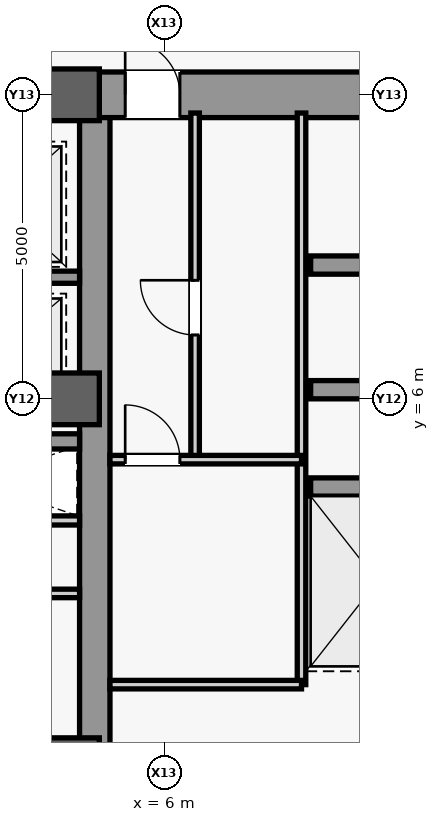
"""IFC4 building model, lengths in metres.
Left out: names, types, materials, properties, quantities, classifications, styles, units other than length and angle.
Written with IfcOpenShell. Run it as: python <this file> out.ifc"""

import sys

from ifc_helpers import new_model, si_unit, direction, frame, frame_2d, origin, origin_2d, place, context, subcontext, project, spatial, rectangle, extrude, source, transform, mapped, element, fill, save


model = new_model("IFC4")
c1 = context("Model", 3, precision=1e-05, world=origin(), true_north=direction((0.0, 1.0)))
c2 = subcontext(c1, "Body", "Model", "MODEL_VIEW")
j1 = project(units=[si_unit("LENGTHUNIT", "METRE"), si_unit("PLANEANGLEUNIT", "RADIAN")], contexts=[c1])
p1 = place(None, origin())
s1 = spatial("IfcSite", under=j1, at=p1, CompositionType="ELEMENT")
p2 = place(p1, origin())
s2 = spatial("IfcBuilding", under=s1, at=p2, CompositionType="ELEMENT")
p3 = place(p2, frame((0.0, 0.0, 159.1)))
s3 = spatial("IfcBuildingStorey", under=s2, at=p3, CompositionType="ELEMENT", Elevation=159.1)
m1 = source(origin(), c2, "Body", "SweptSolid", [
    extrude(rectangle(XDim=21.4, YDim=0.5, at=frame_2d((10.7, 0.0))), origin(), (0.0, 0.0, 1.0), 3.78),
])
p4 = place(p3, frame((4.85, -10.7, 0.0), z_axis=(0.0, 0.0, 1.0), x_axis=(0.0, 1.0, 0.0)))
e1 = element("IfcWall", 1, at=p4, inside=s3, PredefinedType="SHEAR", context=c2, shape_type="MappedRepresentation", body=[
    mapped(m1, transform((0.0, 0.0, 0.0), scale=1.0)),
])
m2 = source(origin(), c2, "Body", "SweptSolid", [
    extrude(rectangle(XDim=5.85, YDim=0.75, at=frame_2d((2.925, 0.0))), origin(), (0.0, 0.0, 1.0), 3.78),
])
p5 = place(p3, frame((4.85, 11.0, 0.0), z_axis=(0.0, 0.0, 1.0), x_axis=(1.0, 0.0, 0.0)))
e2 = element("IfcWall", 2, at=p5, inside=s3, PredefinedType="SHEAR", context=c2, shape_type="MappedRepresentation", body=[
    mapped(m2, transform((0.0, 0.0, 0.0), scale=1.0)),
])
m3 = source(origin(), c2, "Body", "SweptSolid", [
    extrude(rectangle(XDim=0.9, YDim=2.15, at=frame_2d((0.45, 1.075))), frame((0.0, 0.385, 0.0), z_axis=(0.0, -1.0, 0.0), x_axis=(1.0, 0.0, 0.0)), (0.0, 0.0, 1.0), 0.77),
])
p6 = place(p5, frame((0.5, 0.0, 0.0)))
e3 = element("IfcOpeningElement", 3, at=p6, cuts=e2, PredefinedType="OPENING", context=c2, shape_type="MappedRepresentation", body=[
    mapped(m3, transform((0.0, 0.0, 0.0), scale=1.0)),
])
m4 = source(origin(), c2, "Body", "SweptSolid", [
    extrude(rectangle(XDim=9.2, YDim=0.5, at=frame_2d((4.6, 0.0))), origin(), (0.0, 0.0, 1.0), 3.78),
])
p7 = place(p3, frame((-4.6, 11.0, 0.0), z_axis=(0.0, 0.0, 1.0), x_axis=(1.0, 0.0, 0.0)))
e4 = element("IfcWall", 4, at=p7, inside=s3, PredefinedType="SHEAR", context=c2, shape_type="MappedRepresentation", body=[
    mapped(m4, transform((0.0, 0.0, 0.0), scale=1.0)),
])
m5 = source(origin(), c2, "Body", "SweptSolid", [
    extrude(rectangle(XDim=1.8, YDim=2.25, at=frame_2d((0.9, 1.125))), frame((0.0, 0.26, 0.0), z_axis=(0.0, -1.0, 0.0), x_axis=(1.0, 0.0, 0.0)), (0.0, 0.0, 1.0), 0.52),
])
p8 = place(p7, frame((3.7, 0.0, 0.0)))
e5 = element("IfcOpeningElement", 5, at=p8, cuts=e4, PredefinedType="OPENING", context=c2, shape_type="MappedRepresentation", body=[
    mapped(m5, transform((0.0, 0.0, 0.0), scale=1.0)),
])
m6 = source(origin(), c2, "Body", "SweptSolid", [
    extrude(rectangle(XDim=0.85, YDim=0.85, at=origin_2d()), origin(), (0.0, 0.0, 1.0), 4.0),
])
for number, where, z_axis, x_axis in (
    (6, (4.5, 0.0, 0.0), (0.0, 0.0, 1.0), (1.0, 0.0, 0.0)),
    (7, (4.5, 6.0, 0.0), (0.0, 0.0, 1.0), (1.0, 0.0, 0.0)),
    (8, (4.5, 11.0, 0.0), (0.0, 0.0, 1.0), (1.0, 0.0, 0.0)),
):
    element("IfcColumn", number, at=place(p3, frame(where, z_axis=z_axis, x_axis=x_axis)), inside=s3, PredefinedType="COLUMN", context=c2, shape_type="MappedRepresentation", body=[
        mapped(m6, transform((0.0, 0.0, 0.0), scale=1.0)),
    ])
m7 = source(origin(), c2, "Body", "SweptSolid", [
    extrude(rectangle(XDim=2.3, YDim=0.3, at=frame_2d((1.15, 0.0))), origin(), (0.0, 0.0, 1.0), 3.78),
])
for number, where, z_axis, x_axis in (
    (9, (8.4, 4.55, 0.0), (0.0, 0.0, 1.0), (1.0, 0.0, 0.0)),
    (10, (8.4, 6.15, 0.0), (0.0, 0.0, 1.0), (1.0, 0.0, 0.0)),
    (11, (8.4, 8.2, 0.0), (0.0, 0.0, 1.0), (1.0, 0.0, 0.0)),
):
    element("IfcWall", number, at=place(p3, frame(where, z_axis=z_axis, x_axis=x_axis)), inside=s3, PredefinedType="SHEAR", context=c2, shape_type="MappedRepresentation", body=[
        mapped(m7, transform((0.0, 0.0, 0.0), scale=1.0)),
    ])
m8 = source(origin(), c2, "Body", "SweptSolid", [
    extrude(rectangle(XDim=9.4, YDim=0.14, at=frame_2d((4.7, 0.0))), origin(), (0.0, 0.0, 1.0), 3.78),
])
p9 = place(p3, frame((8.25, 1.3, 0.0), z_axis=(0.0, 0.0, 1.0), x_axis=(0.0, 1.0, 0.0)))
e12 = element("IfcWall", 12, at=p9, inside=s3, PredefinedType="PARTITIONING", context=c2, shape_type="MappedRepresentation", body=[
    mapped(m8, transform((0.0, 0.0, 0.0), scale=1.0)),
])
m9 = source(origin(), c2, "Body", "SweptSolid", [
    extrude(rectangle(XDim=3.15, YDim=0.14, at=frame_2d((1.575, 0.0))), origin(), (0.0, 0.0, 1.0), 3.78),
])
p10 = place(p3, frame((5.1, 1.3, 0.0), z_axis=(0.0, 0.0, 1.0), x_axis=(1.0, 0.0, 0.0)))
e13 = element("IfcWall", 13, at=p10, inside=s3, PredefinedType="PARTITIONING", context=c2, shape_type="MappedRepresentation", body=[
    mapped(m9, transform((0.0, 0.0, 0.0), scale=1.0)),
])
m10 = source(origin(), c2, "Body", "SweptSolid", [
    extrude(rectangle(XDim=5.7, YDim=0.14, at=frame_2d((2.85, 0.0))), origin(), (0.0, 0.0, 1.0), 3.78),
])
p11 = place(p3, frame((6.5, 5.0, 0.0), z_axis=(0.0, 0.0, 1.0), x_axis=(0.0, 1.0, 0.0)))
e14 = element("IfcWall", 14, at=p11, inside=s3, PredefinedType="PARTITIONING", context=c2, shape_type="MappedRepresentation", body=[
    mapped(m10, transform((0.0, 0.0, 0.0), scale=1.0)),
])
m11 = source(origin(), c2, "Body", "SweptSolid", [
    extrude(rectangle(XDim=0.9, YDim=2.15, at=frame_2d((0.45, 1.075))), frame((0.0, 0.08, 0.0), z_axis=(0.0, -1.0, 0.0), x_axis=(1.0, 0.0, 0.0)), (0.0, 0.0, 1.0), 0.16),
])
p12 = place(p11, frame((2.05, 0.0, 0.0)))
e15 = element("IfcOpeningElement", 15, at=p12, cuts=e14, PredefinedType="OPENING", context=c2, shape_type="MappedRepresentation", body=[
    mapped(m11, transform((0.0, 0.0, 0.0), scale=1.0)),
])
p13 = place(p3, frame((5.1, 5.0, 0.0), z_axis=(0.0, 0.0, 1.0), x_axis=(1.0, 0.0, 0.0)))
e16 = element("IfcWall", 16, at=p13, inside=s3, PredefinedType="PARTITIONING", context=c2, shape_type="MappedRepresentation", body=[
    mapped(m9, transform((0.0, 0.0, 0.0), scale=1.0)),
])
p14 = place(p13, frame((0.25, 0.0, 0.0)))
e17 = element("IfcOpeningElement", 17, at=p14, cuts=e16, PredefinedType="OPENING", context=c2, shape_type="MappedRepresentation", body=[
    mapped(m11, transform((0.0, 0.0, 0.0), scale=1.0)),
])
m12 = source(origin(), c2, "Body", "SweptSolid", [
    extrude(rectangle(XDim=3.45, YDim=0.15, at=frame_2d((1.725, 0.0))), origin(), (0.0, 0.0, 1.0), 3.78),
])
p15 = place(p3, frame((1.15, 4.0, 0.0), z_axis=(0.0, 0.0, 1.0), x_axis=(1.0, 0.0, 0.0)))
e18 = element("IfcWall", 18, at=p15, inside=s3, PredefinedType="PARTITIONING", context=c2, shape_type="MappedRepresentation", body=[
    mapped(m12, transform((0.0, 0.0, 0.0), scale=1.0)),
])
m13 = source(origin(), c2, "Body", "SweptSolid", [
    extrude(rectangle(XDim=2.45, YDim=0.2, at=frame_2d((1.225, 0.0))), origin(), (0.0, 0.0, 1.0), 3.78),
])
p16 = place(p3, frame((2.15, 8.0, 0.0), z_axis=(0.0, 0.0, 1.0), x_axis=(1.0, 0.0, 0.0)))
e19 = element("IfcWall", 19, at=p16, inside=s3, PredefinedType="SHEAR", context=c2, shape_type="MappedRepresentation", body=[
    mapped(m13, transform((0.0, 0.0, 0.0), scale=1.0)),
])
m14 = source(origin(), c2, "Body", "SweptSolid", [
    extrude(rectangle(XDim=9.2, YDim=0.25, at=frame_2d((4.6, 0.0))), origin(), (0.0, 0.0, 1.0), 3.78),
])
p17 = place(p3, frame((-4.6, 5.3, 0.0), z_axis=(0.0, 0.0, 1.0), x_axis=(1.0, 0.0, 0.0)))
e20 = element("IfcWall", 20, at=p17, inside=s3, PredefinedType="SHEAR", context=c2, shape_type="MappedRepresentation", body=[
    mapped(m14, transform((0.0, 0.0, 0.0), scale=1.0)),
])
m15 = source(origin(), c2, "Body", "SweptSolid", [
    extrude(rectangle(XDim=1.05, YDim=2.2, at=frame_2d((0.525, 1.1))), frame((0.0, 0.135, 0.0), z_axis=(0.0, -1.0, 0.0), x_axis=(1.0, 0.0, 0.0)), (0.0, 0.0, 1.0), 0.27),
])
p18 = place(p17, frame((4.075, 0.0, 0.0)))
e21 = element("IfcOpeningElement", 21, at=p18, cuts=e20, PredefinedType="OPENING", context=c2, shape_type="MappedRepresentation", body=[
    mapped(m15, transform((0.0, 0.0, 0.0), scale=1.0)),
])
m16 = source(origin(), c2, "Body", "SweptSolid", [
    extrude(rectangle(XDim=3.45, YDim=0.14, at=frame_2d((1.725, 0.0))), origin(), (0.0, 0.0, 1.0), 3.78),
])
p19 = place(p3, frame((1.15, 2.8, 0.0), z_axis=(0.0, 0.0, 1.0), x_axis=(1.0, 0.0, 0.0)))
e22 = element("IfcWall", 22, at=p19, inside=s3, PredefinedType="PARTITIONING", context=c2, shape_type="MappedRepresentation", body=[
    mapped(m16, transform((0.0, 0.0, 0.0), scale=1.0)),
])
m17 = source(origin(), c2, "Body", "SweptSolid", [
    extrude(rectangle(XDim=0.9, YDim=2.15, at=frame_2d((0.45, 1.075))), frame((0.0, 0.025, 0.0), z_axis=(0.0, -1.0, 0.0), x_axis=(1.0, 0.0, 0.0)), (0.0, 0.0, 1.0), 0.05),
])
p20 = place(p6, origin())
e23 = element("IfcDoor", 23, at=p20, inside=s3, OperationType="SINGLE_SWING_LEFT", PredefinedType="DOOR", context=c2, shape_type="MappedRepresentation", body=[
    mapped(m17, transform((0.0, 0.0, 0.0), scale=1.0)),
])
fill(e3, e23)
p21 = place(p12, origin())
e24 = element("IfcDoor", 24, at=p21, inside=s3, OperationType="SINGLE_SWING_RIGHT", PredefinedType="DOOR", context=c2, shape_type="MappedRepresentation", body=[
    mapped(m17, transform((0.0, 0.0, 0.0), scale=1.0)),
])
fill(e15, e24)
p22 = place(p14, origin())
e25 = element("IfcDoor", 25, at=p22, inside=s3, OperationType="SINGLE_SWING_LEFT", PredefinedType="DOOR", context=c2, shape_type="MappedRepresentation", body=[
    mapped(m17, transform((0.0, 0.0, 0.0), scale=1.0)),
])
fill(e17, e25)
save(model, sys.argv[1])
